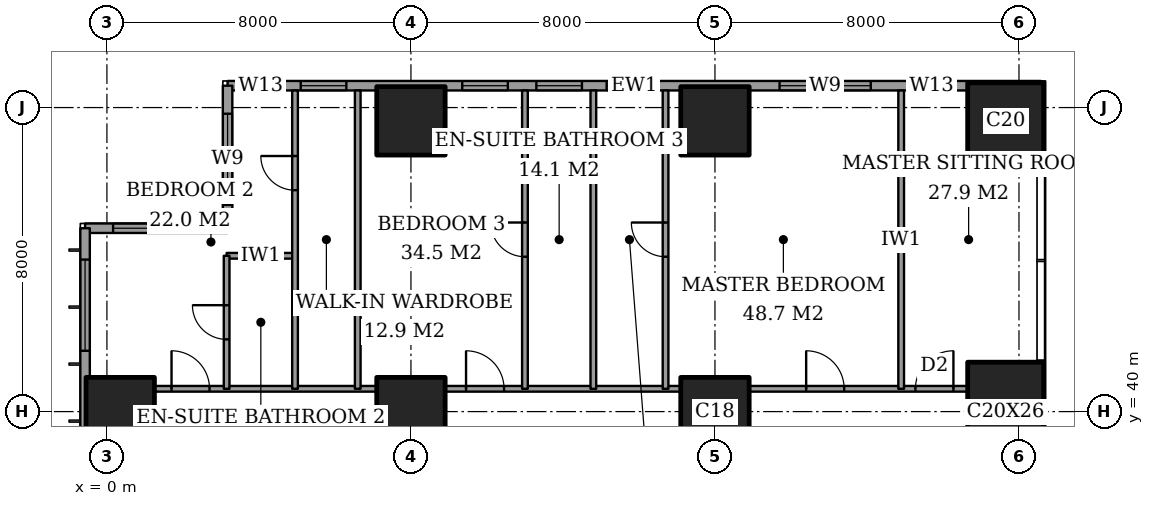
"""IFC4 building model, lengths in metres.
Left out: names, types, materials, properties, quantities, classifications, styles, units other than length and angle.
Written with IfcOpenShell. Run it as: python <this file> out.ifc"""

import sys

from ifc_helpers import new_model, si_unit, direction, frame, frame_2d, origin, origin_2d, place, context, subcontext, project, spatial, rectangle, extrude, element, fill, save


model = new_model("IFC4")
c1 = context("Model", 3, precision=1e-05, world=origin(), true_north=direction((0.0, 1.0)))
c2 = subcontext(c1, "Body", "Model", "MODEL_VIEW")
j1 = project(units=[si_unit("LENGTHUNIT", "METRE"), si_unit("PLANEANGLEUNIT", "RADIAN")], contexts=[c1])
p1 = place(None, origin())
s1 = spatial("IfcSite", under=j1, at=p1, CompositionType="ELEMENT")
p2 = place(p1, origin())
s2 = spatial("IfcBuilding", under=s1, at=p2, CompositionType="ELEMENT")
p3 = place(p2, frame((0.0, 0.0, 193.0)))
s3 = spatial("IfcBuildingStorey", under=s2, at=p3, CompositionType="ELEMENT", Elevation=193.0)
for number, where, z_axis, x_axis in (
    (1, (0.35, 40.0, 0.0), (0.0, 0.0, 1.0), (1.0, 0.0, 0.0)),
    (2, (8.0, 40.0, 0.0), (0.0, 0.0, 1.0), (1.0, 0.0, 0.0)),
    (3, (8.0, 47.65, 0.0), (0.0, 0.0, 1.0), (1.0, 0.0, 0.0)),
    (4, (16.0, 40.0, 0.0), (0.0, 0.0, 1.0), (1.0, 0.0, 0.0)),
    (5, (16.0, 47.65, 0.0), (0.0, 0.0, 1.0), (1.0, 0.0, 0.0)),
):
    element("IfcColumn", number, at=place(p3, frame(where, z_axis=z_axis, x_axis=x_axis)), inside=s3, PredefinedType="COLUMN", context=c2, shape_type="SweptSolid", body=[
        extrude(rectangle(XDim=1.8, YDim=1.8, at=origin_2d()), origin(), (0.0, 0.0, 1.0), 3.6),
    ])
p4 = place(p3, frame((23.65, 40.0, 0.0), z_axis=(0.0, 0.0, 1.0), x_axis=(1.0, 0.0, 0.0)))
e6 = element("IfcColumn", 6, at=p4, inside=s3, PredefinedType="COLUMN", context=c2, shape_type="SweptSolid", body=[
    extrude(rectangle(XDim=2.0, YDim=2.6, at=origin_2d()), origin(), (0.0, 0.0, 1.0), 3.6),
])
p5 = place(p3, frame((23.65, 47.65, 0.0), z_axis=(0.0, 0.0, 1.0), x_axis=(1.0, 0.0, 0.0)))
e7 = element("IfcColumn", 7, at=p5, inside=s3, PredefinedType="COLUMN", context=c2, shape_type="SweptSolid", body=[
    extrude(rectangle(XDim=2.0, YDim=2.0, at=origin_2d()), origin(), (0.0, 0.0, 1.0), 3.6),
])
p6 = place(p3, frame((24.575, 48.575, 0.0), z_axis=(0.0, 0.0, 1.0), x_axis=(-1.0, 0.0, 0.0)))
e8 = element("IfcWall", 8, at=p6, inside=s3, PredefinedType="SOLIDWALL", context=c2, shape_type="SweptSolid", body=[
    extrude(rectangle(XDim=21.4, YDim=0.25, at=frame_2d((10.7, 0.0))), origin(), (0.0, 0.0, 1.0), 3.6),
])
p7 = place(p6, frame((2.275, 0.0, 0.2)))
e9 = element("IfcOpeningElement", 9, at=p7, cuts=e8, PredefinedType="OPENING", context=c2, shape_type="SweptSolid", body=[
    extrude(rectangle(XDim=1.2, YDim=2.4, at=frame_2d((0.6, 1.2))), frame((0.0, 0.135, 0.0), z_axis=(0.0, -1.0, 0.0), x_axis=(1.0, 0.0, 0.0)), (0.0, 0.0, 1.0), 0.27),
])
p8 = place(p6, frame((4.475, 0.0, 0.2)))
e10 = element("IfcOpeningElement", 10, at=p8, cuts=e8, PredefinedType="OPENING", context=c2, shape_type="SweptSolid", body=[
    extrude(rectangle(XDim=2.4, YDim=2.4, at=frame_2d((1.2, 1.2))), frame((0.0, 0.135, 0.0), z_axis=(0.0, -1.0, 0.0), x_axis=(1.0, 0.0, 0.0)), (0.0, 0.0, 1.0), 0.27),
])
p9 = place(p6, frame((10.225, 0.0, 0.2)))
e11 = element("IfcOpeningElement", 11, at=p9, cuts=e8, PredefinedType="OPENING", context=c2, shape_type="SweptSolid", body=[
    extrude(rectangle(XDim=1.2, YDim=2.4, at=frame_2d((0.6, 1.2))), frame((0.0, 0.135, 0.0), z_axis=(0.0, -1.0, 0.0), x_axis=(1.0, 0.0, 0.0)), (0.0, 0.0, 1.0), 0.27),
])
p10 = place(p6, frame((12.075, 0.0, 0.2)))
e12 = element("IfcOpeningElement", 12, at=p10, cuts=e8, PredefinedType="OPENING", context=c2, shape_type="SweptSolid", body=[
    extrude(rectangle(XDim=1.2, YDim=2.4, at=frame_2d((0.6, 1.2))), frame((0.0, 0.135, 0.0), z_axis=(0.0, -1.0, 0.0), x_axis=(1.0, 0.0, 0.0)), (0.0, 0.0, 1.0), 0.27),
])
p11 = place(p6, frame((14.025, 0.0, 0.2)))
e13 = element("IfcOpeningElement", 13, at=p11, cuts=e8, PredefinedType="OPENING", context=c2, shape_type="SweptSolid", body=[
    extrude(rectangle(XDim=1.2, YDim=2.4, at=frame_2d((0.6, 1.2))), frame((0.0, 0.135, 0.0), z_axis=(0.0, -1.0, 0.0), x_axis=(1.0, 0.0, 0.0)), (0.0, 0.0, 1.0), 0.27),
])
p12 = place(p6, frame((18.275, 0.0, 0.2)))
e14 = element("IfcOpeningElement", 14, at=p12, cuts=e8, PredefinedType="OPENING", context=c2, shape_type="SweptSolid", body=[
    extrude(rectangle(XDim=1.2, YDim=2.4, at=frame_2d((0.6, 1.2))), frame((0.0, 0.135, 0.0), z_axis=(0.0, -1.0, 0.0), x_axis=(1.0, 0.0, 0.0)), (0.0, 0.0, 1.0), 0.27),
])
p13 = place(p6, frame((19.925, 0.0, 0.2)))
e15 = element("IfcOpeningElement", 15, at=p13, cuts=e8, PredefinedType="OPENING", context=c2, shape_type="SweptSolid", body=[
    extrude(rectangle(XDim=1.2, YDim=2.4, at=frame_2d((0.6, 1.2))), frame((0.0, 0.135, 0.0), z_axis=(0.0, -1.0, 0.0), x_axis=(1.0, 0.0, 0.0)), (0.0, 0.0, 1.0), 0.27),
])
p14 = place(p3, frame((3.175, 48.575, 0.0), z_axis=(0.0, 0.0, 1.0), x_axis=(0.0, -1.0, 0.0)))
e16 = element("IfcWall", 16, at=p14, inside=s3, PredefinedType="SOLIDWALL", context=c2, shape_type="SweptSolid", body=[
    extrude(rectangle(XDim=3.75, YDim=0.25, at=frame_2d((1.875, 0.0))), origin(), (0.0, 0.0, 1.0), 3.6),
])
p15 = place(p14, frame((0.738, 0.0, 0.2)))
e17 = element("IfcOpeningElement", 17, at=p15, cuts=e16, PredefinedType="OPENING", context=c2, shape_type="SweptSolid", body=[
    extrude(rectangle(XDim=2.4, YDim=2.4, at=frame_2d((1.2, 1.2))), frame((0.0, 0.135, 0.0), z_axis=(0.0, -1.0, 0.0), x_axis=(1.0, 0.0, 0.0)), (0.0, 0.0, 1.0), 0.27),
])
p16 = place(p3, frame((3.175, 44.825, 0.0), z_axis=(0.0, 0.0, 1.0), x_axis=(-1.0, 0.0, 0.0)))
e18 = element("IfcWall", 18, at=p16, inside=s3, PredefinedType="SOLIDWALL", context=c2, shape_type="SweptSolid", body=[
    extrude(rectangle(XDim=3.75, YDim=0.25, at=frame_2d((1.875, 0.0))), origin(), (0.0, 0.0, 1.0), 3.6),
])
p17 = place(p16, frame((0.613, 0.0, 0.2)))
e19 = element("IfcOpeningElement", 19, at=p17, cuts=e18, PredefinedType="OPENING", context=c2, shape_type="SweptSolid", body=[
    extrude(rectangle(XDim=2.4, YDim=2.4, at=frame_2d((1.2, 1.2))), frame((0.0, 0.135, 0.0), z_axis=(0.0, -1.0, 0.0), x_axis=(1.0, 0.0, 0.0)), (0.0, 0.0, 1.0), 0.27),
])
p18 = place(p3, frame((-0.575, 44.825, 0.0), z_axis=(0.0, 0.0, 1.0), x_axis=(0.0, -1.0, 0.0)))
e20 = element("IfcWall", 20, at=p18, inside=s3, PredefinedType="SOLIDWALL", context=c2, shape_type="SweptSolid", body=[
    extrude(rectangle(XDim=41.65, YDim=0.25, at=frame_2d((20.825, 0.0))), origin(), (0.0, 0.0, 1.0), 3.6),
])
p19 = place(p18, frame((0.825, 0.0, 0.2)))
e21 = element("IfcOpeningElement", 21, at=p19, cuts=e20, PredefinedType="OPENING", context=c2, shape_type="SweptSolid", body=[
    extrude(rectangle(XDim=2.4, YDim=2.4, at=frame_2d((1.2, 1.2))), frame((0.0, 0.135, 0.0), z_axis=(0.0, -1.0, 0.0), x_axis=(1.0, 0.0, 0.0)), (0.0, 0.0, 1.0), 0.27),
])
p20 = place(p18, frame((6.05, 0.0, 0.2)))
e22 = element("IfcOpeningElement", 22, at=p20, cuts=e20, PredefinedType="OPENING", context=c2, shape_type="SweptSolid", body=[
    extrude(rectangle(XDim=1.2, YDim=2.4, at=frame_2d((0.6, 1.2))), frame((0.0, 0.135, 0.0), z_axis=(0.0, -1.0, 0.0), x_axis=(1.0, 0.0, 0.0)), (0.0, 0.0, 1.0), 0.27),
])
p21 = place(p18, frame((8.225, 0.0, 0.2)))
e23 = element("IfcOpeningElement", 23, at=p21, cuts=e20, PredefinedType="OPENING", context=c2, shape_type="SweptSolid", body=[
    extrude(rectangle(XDim=2.4, YDim=2.4, at=frame_2d((1.2, 1.2))), frame((0.0, 0.135, 0.0), z_axis=(0.0, -1.0, 0.0), x_axis=(1.0, 0.0, 0.0)), (0.0, 0.0, 1.0), 0.27),
])
p22 = place(p18, frame((15.625, 0.0, 0.2)))
e24 = element("IfcOpeningElement", 24, at=p22, cuts=e20, PredefinedType="OPENING", context=c2, shape_type="SweptSolid", body=[
    extrude(rectangle(XDim=2.4, YDim=2.4, at=frame_2d((1.2, 1.2))), frame((0.0, 0.135, 0.0), z_axis=(0.0, -1.0, 0.0), x_axis=(1.0, 0.0, 0.0)), (0.0, 0.0, 1.0), 0.27),
])
p23 = place(p18, frame((23.625, 0.0, 0.2)))
e25 = element("IfcOpeningElement", 25, at=p23, cuts=e20, PredefinedType="OPENING", context=c2, shape_type="SweptSolid", body=[
    extrude(rectangle(XDim=2.4, YDim=2.4, at=frame_2d((1.2, 1.2))), frame((0.0, 0.135, 0.0), z_axis=(0.0, -1.0, 0.0), x_axis=(1.0, 0.0, 0.0)), (0.0, 0.0, 1.0), 0.27),
])
p24 = place(p18, frame((30.775, 0.0, 0.2)))
e26 = element("IfcOpeningElement", 26, at=p24, cuts=e20, PredefinedType="OPENING", context=c2, shape_type="SweptSolid", body=[
    extrude(rectangle(XDim=2.4, YDim=2.4, at=frame_2d((1.2, 1.2))), frame((0.0, 0.135, 0.0), z_axis=(0.0, -1.0, 0.0), x_axis=(1.0, 0.0, 0.0)), (0.0, 0.0, 1.0), 0.27),
])
p25 = place(p18, frame((34.55, 0.0, 0.2)))
e27 = element("IfcOpeningElement", 27, at=p25, cuts=e20, PredefinedType="OPENING", context=c2, shape_type="SweptSolid", body=[
    extrude(rectangle(XDim=1.2, YDim=2.4, at=frame_2d((0.6, 1.2))), frame((0.0, 0.135, 0.0), z_axis=(0.0, -1.0, 0.0), x_axis=(1.0, 0.0, 0.0)), (0.0, 0.0, 1.0), 0.27),
])
p26 = place(p18, frame((38.425, 0.0, 0.2)))
e28 = element("IfcOpeningElement", 28, at=p26, cuts=e20, PredefinedType="OPENING", context=c2, shape_type="SweptSolid", body=[
    extrude(rectangle(XDim=2.4, YDim=2.4, at=frame_2d((1.2, 1.2))), frame((0.0, 0.135, 0.0), z_axis=(0.0, -1.0, 0.0), x_axis=(1.0, 0.0, 0.0)), (0.0, 0.0, 1.0), 0.27),
])
p27 = place(p3, frame((1.25, 40.6, 0.0), z_axis=(0.0, 0.0, 1.0), x_axis=(1.0, 0.0, 0.0)))
e29 = element("IfcWall", 29, at=p27, inside=s3, PredefinedType="PARTITIONING", context=c2, shape_type="SweptSolid", body=[
    extrude(rectangle(XDim=5.85, YDim=0.15, at=frame_2d((2.925, 0.0))), origin(), (0.0, 0.0, 1.0), 3.35),
])
p28 = place(p27, frame((0.45, 0.0, 0.0)))
e30 = element("IfcOpeningElement", 30, at=p28, cuts=e29, PredefinedType="OPENING", context=c2, shape_type="SweptSolid", body=[
    extrude(rectangle(XDim=1.0, YDim=2.1, at=frame_2d((0.5, 1.05))), frame((0.0, 0.085, 0.0), z_axis=(0.0, -1.0, 0.0), x_axis=(1.0, 0.0, 0.0)), (0.0, 0.0, 1.0), 0.17),
])
p29 = place(p3, frame((8.9, 40.6, 0.0), z_axis=(0.0, 0.0, 1.0), x_axis=(1.0, 0.0, 0.0)))
e31 = element("IfcWall", 31, at=p29, inside=s3, PredefinedType="PARTITIONING", context=c2, shape_type="SweptSolid", body=[
    extrude(rectangle(XDim=6.2, YDim=0.15, at=frame_2d((3.1, 0.0))), origin(), (0.0, 0.0, 1.0), 3.35),
])
p30 = place(p29, frame((0.55, 0.0, 0.0)))
e32 = element("IfcOpeningElement", 32, at=p30, cuts=e31, PredefinedType="OPENING", context=c2, shape_type="SweptSolid", body=[
    extrude(rectangle(XDim=1.0, YDim=2.1, at=frame_2d((0.5, 1.05))), frame((0.0, 0.085, 0.0), z_axis=(0.0, -1.0, 0.0), x_axis=(1.0, 0.0, 0.0)), (0.0, 0.0, 1.0), 0.17),
])
p31 = place(p3, frame((16.9, 40.6, 0.0), z_axis=(0.0, 0.0, 1.0), x_axis=(1.0, 0.0, 0.0)))
e33 = element("IfcWall", 33, at=p31, inside=s3, PredefinedType="PARTITIONING", context=c2, shape_type="SweptSolid", body=[
    extrude(rectangle(XDim=5.75, YDim=0.15, at=frame_2d((2.875, 0.0))), origin(), (0.0, 0.0, 1.0), 3.35),
])
p32 = place(p31, frame((1.5, 0.0, 0.0)))
e34 = element("IfcOpeningElement", 34, at=p32, cuts=e33, PredefinedType="OPENING", context=c2, shape_type="SweptSolid", body=[
    extrude(rectangle(XDim=1.0, YDim=2.1, at=frame_2d((0.5, 1.05))), frame((0.0, 0.085, 0.0), z_axis=(0.0, -1.0, 0.0), x_axis=(1.0, 0.0, 0.0)), (0.0, 0.0, 1.0), 0.17),
])
p33 = place(p31, frame((4.375, 0.0, 0.0)))
e35 = element("IfcOpeningElement", 35, at=p33, cuts=e33, PredefinedType="OPENING", context=c2, shape_type="SweptSolid", body=[
    extrude(rectangle(XDim=1.0, YDim=2.1, at=frame_2d((0.5, 1.05))), frame((0.0, 0.085, 0.0), z_axis=(0.0, -1.0, 0.0), x_axis=(1.0, 0.0, 0.0)), (0.0, 0.0, 1.0), 0.17),
])
p34 = place(p3, frame((3.15, 44.1, 0.0), z_axis=(0.0, 0.0, 1.0), x_axis=(1.0, 0.0, 0.0)))
e36 = element("IfcWall", 36, at=p34, inside=s3, PredefinedType="PARTITIONING", context=c2, shape_type="SweptSolid", body=[
    extrude(rectangle(XDim=1.8, YDim=0.15, at=frame_2d((0.9, 0.0))), origin(), (0.0, 0.0, 1.0), 3.35),
])
p35 = place(p3, frame((3.15, 40.6, 0.0), z_axis=(0.0, 0.0, 1.0), x_axis=(0.0, 1.0, 0.0)))
e37 = element("IfcWall", 37, at=p35, inside=s3, PredefinedType="PARTITIONING", context=c2, shape_type="SweptSolid", body=[
    extrude(rectangle(XDim=3.5, YDim=0.15, at=frame_2d((1.75, 0.0))), origin(), (0.0, 0.0, 1.0), 3.35),
])
p36 = place(p35, frame((1.3, 0.0, 0.0)))
e38 = element("IfcOpeningElement", 38, at=p36, cuts=e37, PredefinedType="OPENING", context=c2, shape_type="SweptSolid", body=[
    extrude(rectangle(XDim=0.9, YDim=2.1, at=frame_2d((0.45, 1.05))), frame((0.0, 0.085, 0.0), z_axis=(0.0, -1.0, 0.0), x_axis=(1.0, 0.0, 0.0)), (0.0, 0.0, 1.0), 0.17),
])
p37 = place(p3, frame((4.95, 40.6, 0.0), z_axis=(0.0, 0.0, 1.0), x_axis=(0.0, 1.0, 0.0)))
e39 = element("IfcWall", 39, at=p37, inside=s3, PredefinedType="PARTITIONING", context=c2, shape_type="SweptSolid", body=[
    extrude(rectangle(XDim=7.85, YDim=0.15, at=frame_2d((3.925, 0.0))), origin(), (0.0, 0.0, 1.0), 3.35),
])
p38 = place(p37, frame((5.225, 0.0, 0.0)))
e40 = element("IfcOpeningElement", 40, at=p38, cuts=e39, PredefinedType="OPENING", context=c2, shape_type="SweptSolid", body=[
    extrude(rectangle(XDim=0.9, YDim=2.1, at=frame_2d((0.45, 1.05))), frame((0.0, 0.085, 0.0), z_axis=(0.0, -1.0, 0.0), x_axis=(1.0, 0.0, 0.0)), (0.0, 0.0, 1.0), 0.17),
])
p39 = place(p3, frame((6.6, 40.6, 0.0), z_axis=(0.0, 0.0, 1.0), x_axis=(0.0, 1.0, 0.0)))
e41 = element("IfcWall", 41, at=p39, inside=s3, PredefinedType="PARTITIONING", context=c2, shape_type="SweptSolid", body=[
    extrude(rectangle(XDim=7.85, YDim=0.15, at=frame_2d((3.925, 0.0))), origin(), (0.0, 0.0, 1.0), 3.35),
])
p40 = place(p3, frame((11.0, 40.6, 0.0), z_axis=(0.0, 0.0, 1.0), x_axis=(0.0, 1.0, 0.0)))
e42 = element("IfcWall", 42, at=p40, inside=s3, PredefinedType="PARTITIONING", context=c2, shape_type="SweptSolid", body=[
    extrude(rectangle(XDim=7.85, YDim=0.15, at=frame_2d((3.925, 0.0))), origin(), (0.0, 0.0, 1.0), 3.35),
])
p41 = place(p40, frame((3.475, 0.0, 0.0)))
e43 = element("IfcOpeningElement", 43, at=p41, cuts=e42, PredefinedType="OPENING", context=c2, shape_type="SweptSolid", body=[
    extrude(rectangle(XDim=0.9, YDim=2.1, at=frame_2d((0.45, 1.05))), frame((0.0, 0.085, 0.0), z_axis=(0.0, -1.0, 0.0), x_axis=(1.0, 0.0, 0.0)), (0.0, 0.0, 1.0), 0.17),
])
p42 = place(p3, frame((12.8, 40.6, 0.0), z_axis=(0.0, 0.0, 1.0), x_axis=(0.0, 1.0, 0.0)))
e44 = element("IfcWall", 44, at=p42, inside=s3, PredefinedType="PARTITIONING", context=c2, shape_type="SweptSolid", body=[
    extrude(rectangle(XDim=7.85, YDim=0.15, at=frame_2d((3.925, 0.0))), origin(), (0.0, 0.0, 1.0), 3.35),
])
p43 = place(p3, frame((14.7, 40.6, 0.0), z_axis=(0.0, 0.0, 1.0), x_axis=(0.0, 1.0, 0.0)))
e45 = element("IfcWall", 45, at=p43, inside=s3, PredefinedType="PARTITIONING", context=c2, shape_type="SweptSolid", body=[
    extrude(rectangle(XDim=7.85, YDim=0.15, at=frame_2d((3.925, 0.0))), origin(), (0.0, 0.0, 1.0), 3.35),
])
p44 = place(p43, frame((3.475, 0.0, 0.0)))
e46 = element("IfcOpeningElement", 46, at=p44, cuts=e45, PredefinedType="OPENING", context=c2, shape_type="SweptSolid", body=[
    extrude(rectangle(XDim=0.9, YDim=2.1, at=frame_2d((0.45, 1.05))), frame((0.0, 0.085, 0.0), z_axis=(0.0, -1.0, 0.0), x_axis=(1.0, 0.0, 0.0)), (0.0, 0.0, 1.0), 0.17),
])
p45 = place(p3, frame((20.9, 40.6, 0.0), z_axis=(0.0, 0.0, 1.0), x_axis=(0.0, 1.0, 0.0)))
e47 = element("IfcWall", 47, at=p45, inside=s3, PredefinedType="PARTITIONING", context=c2, shape_type="SweptSolid", body=[
    extrude(rectangle(XDim=7.85, YDim=0.15, at=frame_2d((3.925, 0.0))), origin(), (0.0, 0.0, 1.0), 3.35),
])
p46 = place(p7, origin())
e48 = element("IfcWindow", 48, at=p46, inside=s3, PartitioningType="SINGLE_PANEL", PredefinedType="WINDOW", context=c2, shape_type="SweptSolid", body=[
    extrude(rectangle(XDim=1.2, YDim=2.4, at=frame_2d((0.6, 1.2))), frame((0.0, 0.03, 0.0), z_axis=(0.0, -1.0, 0.0), x_axis=(1.0, 0.0, 0.0)), (0.0, 0.0, 1.0), 0.06),
])
fill(e9, e48)
p47 = place(p8, origin())
e49 = element("IfcWindow", 49, at=p47, inside=s3, PartitioningType="SINGLE_PANEL", PredefinedType="WINDOW", context=c2, shape_type="SweptSolid", body=[
    extrude(rectangle(XDim=2.4, YDim=2.4, at=frame_2d((1.2, 1.2))), frame((0.0, 0.03, 0.0), z_axis=(0.0, -1.0, 0.0), x_axis=(1.0, 0.0, 0.0)), (0.0, 0.0, 1.0), 0.06),
])
fill(e10, e49)
p48 = place(p9, origin())
e50 = element("IfcWindow", 50, at=p48, inside=s3, PartitioningType="SINGLE_PANEL", PredefinedType="WINDOW", context=c2, shape_type="SweptSolid", body=[
    extrude(rectangle(XDim=1.2, YDim=2.4, at=frame_2d((0.6, 1.2))), frame((0.0, 0.03, 0.0), z_axis=(0.0, -1.0, 0.0), x_axis=(1.0, 0.0, 0.0)), (0.0, 0.0, 1.0), 0.06),
])
fill(e11, e50)
p49 = place(p10, origin())
e51 = element("IfcWindow", 51, at=p49, inside=s3, PartitioningType="SINGLE_PANEL", PredefinedType="WINDOW", context=c2, shape_type="SweptSolid", body=[
    extrude(rectangle(XDim=1.2, YDim=2.4, at=frame_2d((0.6, 1.2))), frame((0.0, 0.03, 0.0), z_axis=(0.0, -1.0, 0.0), x_axis=(1.0, 0.0, 0.0)), (0.0, 0.0, 1.0), 0.06),
])
fill(e12, e51)
p50 = place(p11, origin())
e52 = element("IfcWindow", 52, at=p50, inside=s3, PartitioningType="SINGLE_PANEL", PredefinedType="WINDOW", context=c2, shape_type="SweptSolid", body=[
    extrude(rectangle(XDim=1.2, YDim=2.4, at=frame_2d((0.6, 1.2))), frame((0.0, 0.03, 0.0), z_axis=(0.0, -1.0, 0.0), x_axis=(1.0, 0.0, 0.0)), (0.0, 0.0, 1.0), 0.06),
])
fill(e13, e52)
p51 = place(p12, origin())
e53 = element("IfcWindow", 53, at=p51, inside=s3, PartitioningType="SINGLE_PANEL", PredefinedType="WINDOW", context=c2, shape_type="SweptSolid", body=[
    extrude(rectangle(XDim=1.2, YDim=2.4, at=frame_2d((0.6, 1.2))), frame((0.0, 0.03, 0.0), z_axis=(0.0, -1.0, 0.0), x_axis=(1.0, 0.0, 0.0)), (0.0, 0.0, 1.0), 0.06),
])
fill(e14, e53)
p52 = place(p13, origin())
e54 = element("IfcWindow", 54, at=p52, inside=s3, PartitioningType="SINGLE_PANEL", PredefinedType="WINDOW", context=c2, shape_type="SweptSolid", body=[
    extrude(rectangle(XDim=1.2, YDim=2.4, at=frame_2d((0.6, 1.2))), frame((0.0, 0.03, 0.0), z_axis=(0.0, -1.0, 0.0), x_axis=(1.0, 0.0, 0.0)), (0.0, 0.0, 1.0), 0.06),
])
fill(e15, e54)
p53 = place(p15, origin())
e55 = element("IfcWindow", 55, at=p53, inside=s3, PartitioningType="SINGLE_PANEL", PredefinedType="WINDOW", context=c2, shape_type="SweptSolid", body=[
    extrude(rectangle(XDim=2.4, YDim=2.4, at=frame_2d((1.2, 1.2))), frame((0.0, 0.03, 0.0), z_axis=(0.0, -1.0, 0.0), x_axis=(1.0, 0.0, 0.0)), (0.0, 0.0, 1.0), 0.06),
])
fill(e17, e55)
p54 = place(p17, origin())
e56 = element("IfcWindow", 56, at=p54, inside=s3, PartitioningType="SINGLE_PANEL", PredefinedType="WINDOW", context=c2, shape_type="SweptSolid", body=[
    extrude(rectangle(XDim=2.4, YDim=2.4, at=frame_2d((1.2, 1.2))), frame((0.0, 0.03, 0.0), z_axis=(0.0, -1.0, 0.0), x_axis=(1.0, 0.0, 0.0)), (0.0, 0.0, 1.0), 0.06),
])
fill(e19, e56)
p55 = place(p19, origin())
e57 = element("IfcWindow", 57, at=p55, inside=s3, PartitioningType="SINGLE_PANEL", PredefinedType="WINDOW", context=c2, shape_type="SweptSolid", body=[
    extrude(rectangle(XDim=2.4, YDim=2.4, at=frame_2d((1.2, 1.2))), frame((0.0, 0.03, 0.0), z_axis=(0.0, -1.0, 0.0), x_axis=(1.0, 0.0, 0.0)), (0.0, 0.0, 1.0), 0.06),
])
fill(e21, e57)
p56 = place(p36, origin())
e58 = element("IfcDoor", 58, at=p56, inside=s3, OperationType="SINGLE_SWING_LEFT", PredefinedType="DOOR", context=c2, shape_type="SweptSolid", body=[
    extrude(rectangle(XDim=0.9, YDim=2.1, at=frame_2d((0.45, 1.05))), frame((0.0, 0.025, 0.0), z_axis=(0.0, -1.0, 0.0), x_axis=(1.0, 0.0, 0.0)), (0.0, 0.0, 1.0), 0.05),
])
fill(e38, e58)
p57 = place(p28, origin())
e59 = element("IfcDoor", 59, at=p57, inside=s3, OperationType="SINGLE_SWING_RIGHT", PredefinedType="DOOR", context=c2, shape_type="SweptSolid", body=[
    extrude(rectangle(XDim=1.0, YDim=2.1, at=frame_2d((0.5, 1.05))), frame((0.0, 0.025, 0.0), z_axis=(0.0, -1.0, 0.0), x_axis=(1.0, 0.0, 0.0)), (0.0, 0.0, 1.0), 0.05),
])
fill(e30, e59)
p58 = place(p38, origin())
e60 = element("IfcDoor", 60, at=p58, inside=s3, OperationType="SINGLE_SWING_LEFT", PredefinedType="DOOR", context=c2, shape_type="SweptSolid", body=[
    extrude(rectangle(XDim=0.9, YDim=2.1, at=frame_2d((0.45, 1.05))), frame((0.0, 0.025, 0.0), z_axis=(0.0, -1.0, 0.0), x_axis=(1.0, 0.0, 0.0)), (0.0, 0.0, 1.0), 0.05),
])
fill(e40, e60)
p59 = place(p30, origin())
e61 = element("IfcDoor", 61, at=p59, inside=s3, OperationType="SINGLE_SWING_RIGHT", PredefinedType="DOOR", context=c2, shape_type="SweptSolid", body=[
    extrude(rectangle(XDim=1.0, YDim=2.1, at=frame_2d((0.5, 1.05))), frame((0.0, 0.025, 0.0), z_axis=(0.0, -1.0, 0.0), x_axis=(1.0, 0.0, 0.0)), (0.0, 0.0, 1.0), 0.05),
])
fill(e32, e61)
p60 = place(p41, origin())
e62 = element("IfcDoor", 62, at=p60, inside=s3, OperationType="SINGLE_SWING_LEFT", PredefinedType="DOOR", context=c2, shape_type="SweptSolid", body=[
    extrude(rectangle(XDim=0.9, YDim=2.1, at=frame_2d((0.45, 1.05))), frame((0.0, 0.025, 0.0), z_axis=(0.0, -1.0, 0.0), x_axis=(1.0, 0.0, 0.0)), (0.0, 0.0, 1.0), 0.05),
])
fill(e43, e62)
p61 = place(p44, origin())
e63 = element("IfcDoor", 63, at=p61, inside=s3, OperationType="SINGLE_SWING_LEFT", PredefinedType="DOOR", context=c2, shape_type="SweptSolid", body=[
    extrude(rectangle(XDim=0.9, YDim=2.1, at=frame_2d((0.45, 1.05))), frame((0.0, 0.025, 0.0), z_axis=(0.0, -1.0, 0.0), x_axis=(1.0, 0.0, 0.0)), (0.0, 0.0, 1.0), 0.05),
])
fill(e46, e63)
p62 = place(p32, origin())
e64 = element("IfcDoor", 64, at=p62, inside=s3, OperationType="SINGLE_SWING_RIGHT", PredefinedType="DOOR", context=c2, shape_type="SweptSolid", body=[
    extrude(rectangle(XDim=1.0, YDim=2.1, at=frame_2d((0.5, 1.05))), frame((0.0, 0.025, 0.0), z_axis=(0.0, -1.0, 0.0), x_axis=(1.0, 0.0, 0.0)), (0.0, 0.0, 1.0), 0.05),
])
fill(e34, e64)
p63 = place(p33, origin())
e65 = element("IfcDoor", 65, at=p63, inside=s3, OperationType="SINGLE_SWING_LEFT", PredefinedType="DOOR", context=c2, shape_type="SweptSolid", body=[
    extrude(rectangle(XDim=1.0, YDim=2.1, at=frame_2d((0.5, 1.05))), frame((0.0, 0.025, 0.0), z_axis=(0.0, -1.0, 0.0), x_axis=(1.0, 0.0, 0.0)), (0.0, 0.0, 1.0), 0.05),
])
fill(e35, e65)
save(model, sys.argv[1])
